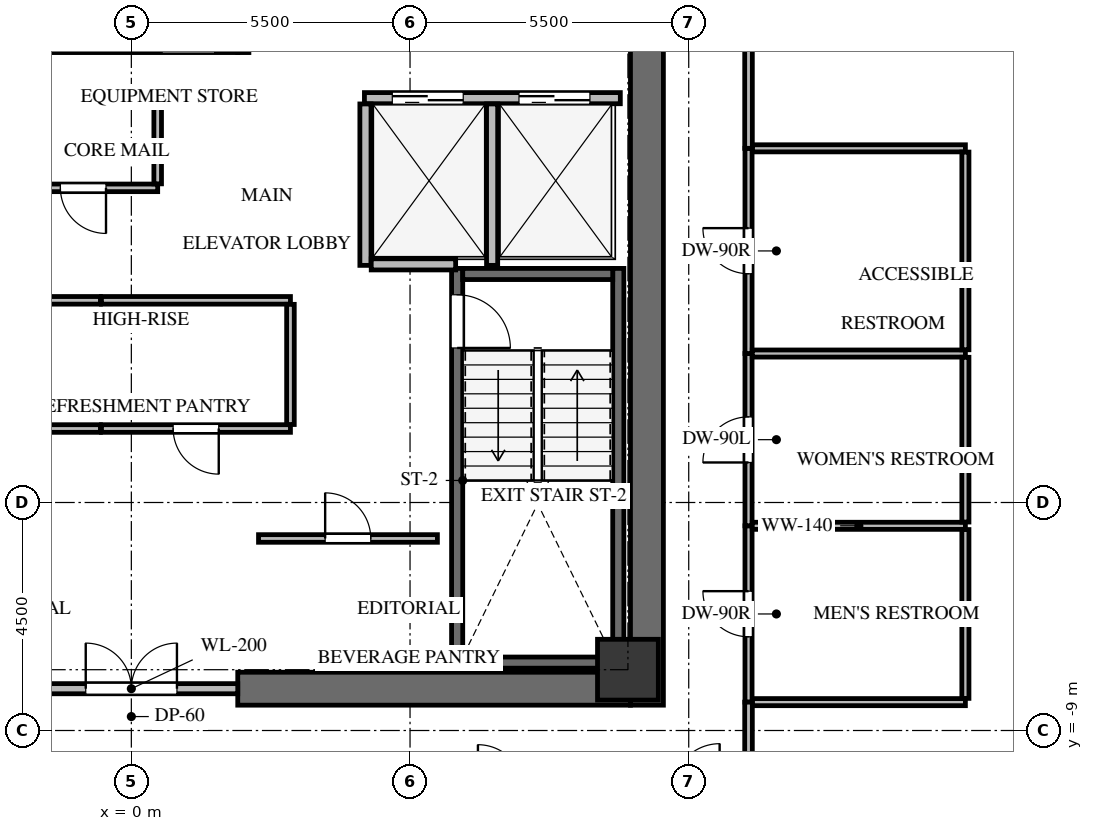
"""IFC4 building model, lengths in metres.
Left out: names, types, materials, properties, quantities, classifications, styles, units other than length and angle.
Written with IfcOpenShell. Run it as: python <this file> out.ifc"""

import sys

from ifc_helpers import new_model, si_unit, direction, frame, frame_2d, origin, origin_2d, place, context, subcontext, project, spatial, rectangle, extrude, source, transform, mapped, element, fill, save


model = new_model("IFC4")
c1 = context("Model", 3, precision=1e-05, world=origin(), true_north=direction((0.0, 1.0)))
c2 = subcontext(c1, "Body", "Model", "MODEL_VIEW")
j1 = project(units=[si_unit("LENGTHUNIT", "METRE"), si_unit("PLANEANGLEUNIT", "RADIAN")], contexts=[c1])
p1 = place(None, origin())
s1 = spatial("IfcSite", under=j1, at=p1, CompositionType="ELEMENT")
p2 = place(p1, origin())
s2 = spatial("IfcBuilding", under=s1, at=p2, CompositionType="ELEMENT")
p3 = place(p2, frame((0.0, 0.0, 173.8)))
s3 = spatial("IfcBuildingStorey", under=s2, at=p3, CompositionType="ELEMENT", Elevation=173.8)
p4 = place(p3, frame((10.175, -8.5, 0.0), z_axis=(0.0, 0.0, 1.0), x_axis=(0.0, 1.0, 0.0)))
e1 = element("IfcWall", 1, at=p4, inside=s3, PredefinedType="SHEAR", context=c2, shape_type="SweptSolid", body=[
    extrude(rectangle(XDim=17.0, YDim=0.65, at=frame_2d((8.5, 0.0))), origin(), (0.0, 0.0, 1.0), 3.3),
])
p5 = place(p3, frame((2.1, -8.175, 0.0), z_axis=(0.0, 0.0, 1.0), x_axis=(1.0, 0.0, 0.0)))
e2 = element("IfcWall", 2, at=p5, inside=s3, PredefinedType="SHEAR", context=c2, shape_type="SweptSolid", body=[
    extrude(rectangle(XDim=7.75, YDim=0.65, at=frame_2d((3.875, 0.0))), origin(), (0.0, 0.0, 1.0), 3.3),
])
p6 = place(p3, frame((9.61, -7.77, -0.24), z_axis=(0.0, 0.0, 1.0), x_axis=(0.0, 1.0, 0.0)))
e3 = element("IfcWall", 3, at=p6, inside=s3, PredefinedType="SHEAR", context=c2, shape_type="SweptSolid", body=[
    extrude(rectangle(XDim=7.89, YDim=0.22, at=frame_2d((3.945, 0.0))), origin(), (0.0, 0.0, 1.0), 3.3),
])
p7 = place(p3, frame((6.43, 0.12, -0.24), z_axis=(0.0, 0.0, 1.0), x_axis=(0.0, -1.0, 0.0)))
e4 = element("IfcWall", 4, at=p7, inside=s3, PredefinedType="SHEAR", context=c2, shape_type="SweptSolid", body=[
    extrude(rectangle(XDim=7.89, YDim=0.22, at=frame_2d((3.945, 0.0))), origin(), (0.0, 0.0, 1.0), 3.3),
])
p8 = place(p7, frame((0.52, 0.0, 0.0)))
e5 = element("IfcOpeningElement", 5, at=p8, cuts=e4, PredefinedType="OPENING", context=c2, shape_type="SweptSolid", body=[
    extrude(rectangle(XDim=1.05, YDim=2.15, at=frame_2d((0.525, 1.075))), frame((0.0, 0.12, 0.0), z_axis=(0.0, -1.0, 0.0), x_axis=(1.0, 0.0, 0.0)), (0.0, 0.0, 1.0), 0.24),
])
for number, where, z_axis, x_axis in (
    (6, (6.54, -7.66, -0.24), (0.0, 0.0, 1.0), (1.0, 0.0, 0.0)),
    (7, (9.5, 0.01, -0.24), (0.0, 0.0, 1.0), (-1.0, 0.0, 0.0)),
):
    element("IfcWall", number, at=place(p3, frame(where, z_axis=z_axis, x_axis=x_axis)), inside=s3, PredefinedType="SHEAR", context=c2, shape_type="SweptSolid", body=[
        extrude(rectangle(XDim=2.96, YDim=0.22, at=frame_2d((1.48, 0.0))), origin(), (0.0, 0.0, 1.0), 3.3),
    ])
p9 = place(p3, frame((2.21, 4.38, -0.24), z_axis=(0.0, 0.0, 1.0), x_axis=(0.0, 1.0, 0.0)))
e8 = element("IfcWall", 8, at=p9, inside=s3, PredefinedType="SHEAR", context=c2, shape_type="SweptSolid", body=[
    extrude(rectangle(XDim=3.4, YDim=0.22, at=frame_2d((1.7, 0.0))), origin(), (0.0, 0.0, 1.0), 3.3),
])
p10 = place(p3, frame((-5.25, 4.49, -0.24), z_axis=(0.0, 0.0, 1.0), x_axis=(1.0, 0.0, 0.0)))
e9 = element("IfcWall", 9, at=p10, inside=s3, PredefinedType="SHEAR", context=c2, shape_type="SweptSolid", body=[
    extrude(rectangle(XDim=7.35, YDim=0.22, at=frame_2d((3.675, 0.0))), origin(), (0.0, 0.0, 1.0), 3.3),
])
p11 = place(p10, frame((5.85, 0.0, 0.0)))
e10 = element("IfcOpeningElement", 10, at=p11, cuts=e9, PredefinedType="OPENING", context=c2, shape_type="SweptSolid", body=[
    extrude(rectangle(XDim=1.05, YDim=2.15, at=frame_2d((0.525, 1.075))), frame((0.0, 0.12, 0.0), z_axis=(0.0, -1.0, 0.0), x_axis=(1.0, 0.0, 0.0)), (0.0, 0.0, 1.0), 0.24),
])
m1 = source(origin(), c2, "Body", "SweptSolid", [
    extrude(rectangle(XDim=1.2, YDim=1.2, at=origin_2d()), origin(), (0.0, 0.0, 1.0), 3.3),
])
p12 = place(p3, frame((9.8, -7.8, -0.24), z_axis=(0.0, 0.0, 1.0), x_axis=(1.0, 0.0, 0.0)))
e11 = element("IfcColumn", 11, at=p12, inside=s3, PredefinedType="COLUMN", context=c2, shape_type="MappedRepresentation", body=[
    mapped(m1, transform((0.0, 0.0, 0.0), x_axis=(1.0, 0.0, 0.0), y_axis=(0.0, 1.0, 0.0), z_axis=(0.0, 0.0, 1.0), scale=1.0)),
])
p13 = place(p3, frame((-2.1, -8.175, 0.0), z_axis=(0.0, 0.0, 1.0), x_axis=(1.0, 0.0, 0.0)))
e12 = element("IfcWall", 12, at=p13, inside=s3, PredefinedType="SOLIDWALL", context=c2, shape_type="SweptSolid", body=[
    extrude(rectangle(XDim=4.2, YDim=0.2, at=frame_2d((2.1, 0.0))), origin(), (0.0, 0.0, 1.0), 3.045),
])
p14 = place(p13, frame((1.2, 0.0, 0.0)))
e13 = element("IfcOpeningElement", 13, at=p14, cuts=e12, PredefinedType="OPENING", context=c2, shape_type="SweptSolid", body=[
    extrude(rectangle(XDim=1.8, YDim=2.15, at=frame_2d((0.9, 1.075))), frame((0.0, 0.11, 0.0), z_axis=(0.0, -1.0, 0.0), x_axis=(1.0, 0.0, 0.0)), (0.0, 0.0, 1.0), 0.22),
])
p15 = place(p3, frame((4.6, 3.48, 0.0), z_axis=(0.0, 0.0, 1.0), x_axis=(1.0, 0.0, 0.0)))
e14 = element("IfcWall", 14, at=p15, inside=s3, PredefinedType="SOLIDWALL", context=c2, shape_type="SweptSolid", body=[
    extrude(rectangle(XDim=5.05, YDim=0.22, at=frame_2d((2.525, 0.0))), origin(), (0.0, 0.0, 1.0), 3.045),
])
p16 = place(p15, frame((0.55, 0.0, 0.0)))
e15 = element("IfcOpeningElement", 15, at=p16, cuts=e14, PredefinedType="OPENING", context=c2, shape_type="SweptSolid", body=[
    extrude(rectangle(XDim=1.4, YDim=2.15, at=frame_2d((0.7, 1.075))), frame((0.0, 0.12, 0.0), z_axis=(0.0, -1.0, 0.0), x_axis=(1.0, 0.0, 0.0)), (0.0, 0.0, 1.0), 0.24),
])
p17 = place(p15, frame((3.05, 0.0, 0.0)))
e16 = element("IfcOpeningElement", 16, at=p17, cuts=e14, PredefinedType="OPENING", context=c2, shape_type="SweptSolid", body=[
    extrude(rectangle(XDim=1.4, YDim=2.15, at=frame_2d((0.7, 1.075))), frame((0.0, 0.12, 0.0), z_axis=(0.0, -1.0, 0.0), x_axis=(1.0, 0.0, 0.0)), (0.0, 0.0, 1.0), 0.24),
])
for number, where, z_axis, x_axis in (
    (17, (4.62, 0.18, 0.0), (0.0, 0.0, 1.0), (0.0, 1.0, 0.0)),
    (18, (7.12, 0.18, 0.0), (0.0, 0.0, 1.0), (0.0, 1.0, 0.0)),
):
    element("IfcWall", number, at=place(p3, frame(where, z_axis=z_axis, x_axis=x_axis)), inside=s3, PredefinedType="SOLIDWALL", context=c2, shape_type="SweptSolid", body=[
        extrude(rectangle(XDim=3.186, YDim=0.22, at=frame_2d((1.593, 0.0))), origin(), (0.0, 0.0, 1.0), 3.045),
    ])
p18 = place(p3, frame((4.734, 0.2, 0.0), z_axis=(0.0, 0.0, 1.0), x_axis=(1.0, 0.0, 0.0)))
e19 = element("IfcWall", 19, at=p18, inside=s3, PredefinedType="SOLIDWALL", context=c2, shape_type="SweptSolid", body=[
    extrude(rectangle(XDim=1.666, YDim=0.22, at=frame_2d((0.833, 0.0))), origin(), (0.0, 0.0, 1.0), 3.045),
])
p19 = place(p3, frame((2.51, -5.21, 0.0), z_axis=(0.0, 0.0, 1.0), x_axis=(1.0, 0.0, 0.0)))
e20 = element("IfcWall", 20, at=p19, inside=s3, PredefinedType="PARTITIONING", context=c2, shape_type="SweptSolid", body=[
    extrude(rectangle(XDim=3.53, YDim=0.15, at=frame_2d((1.765, 0.0))), origin(), (0.0, 0.0, 1.0), 3.045),
])
p20 = place(p19, frame((1.315, 0.0, 0.0)))
e21 = element("IfcOpeningElement", 21, at=p20, cuts=e20, PredefinedType="OPENING", context=c2, shape_type="SweptSolid", body=[
    extrude(rectangle(XDim=0.9, YDim=2.05, at=frame_2d((0.45, 1.025))), frame((0.0, 0.085, 0.0), z_axis=(0.0, -1.0, 0.0), x_axis=(1.0, 0.0, 0.0)), (0.0, 0.0, 1.0), 0.17),
])
p21 = place(p3, frame((-0.61, -3.04, 0.0), z_axis=(0.0, 0.0, 1.0), x_axis=(-1.0, 0.0, 0.0)))
e22 = element("IfcWall", 22, at=p21, inside=s3, PredefinedType="PARTITIONING", context=c2, shape_type="SweptSolid", body=[
    extrude(rectangle(XDim=3.73, YDim=0.15, at=frame_2d((1.865, 0.0))), origin(), (0.0, 0.0, 1.0), 3.045),
])
p22 = place(p21, frame((1.415, 0.0, 0.0)))
e23 = element("IfcOpeningElement", 23, at=p22, cuts=e22, PredefinedType="OPENING", context=c2, shape_type="SweptSolid", body=[
    extrude(rectangle(XDim=0.9, YDim=2.05, at=frame_2d((0.45, 1.025))), frame((0.0, 0.085, 0.0), z_axis=(0.0, -1.0, 0.0), x_axis=(1.0, 0.0, 0.0)), (0.0, 0.0, 1.0), 0.17),
])
p23 = place(p3, frame((-4.34, -0.51, 0.0), z_axis=(0.0, 0.0, 1.0), x_axis=(1.0, 0.0, 0.0)))
e24 = element("IfcWall", 24, at=p23, inside=s3, PredefinedType="PARTITIONING", context=c2, shape_type="SweptSolid", body=[
    extrude(rectangle(XDim=3.73, YDim=0.15, at=frame_2d((1.865, 0.0))), origin(), (0.0, 0.0, 1.0), 3.045),
])
p24 = place(p3, frame((3.14, -3.04, 0.0), z_axis=(0.0, 0.0, 1.0), x_axis=(-1.0, 0.0, 0.0)))
e25 = element("IfcWall", 25, at=p24, inside=s3, PredefinedType="PARTITIONING", context=c2, shape_type="SweptSolid", body=[
    extrude(rectangle(XDim=3.73, YDim=0.15, at=frame_2d((1.865, 0.0))), origin(), (0.0, 0.0, 1.0), 3.045),
])
p25 = place(p24, frame((1.415, 0.0, 0.0)))
e26 = element("IfcOpeningElement", 26, at=p25, cuts=e25, PredefinedType="OPENING", context=c2, shape_type="SweptSolid", body=[
    extrude(rectangle(XDim=0.9, YDim=2.05, at=frame_2d((0.45, 1.025))), frame((0.0, 0.085, 0.0), z_axis=(0.0, -1.0, 0.0), x_axis=(1.0, 0.0, 0.0)), (0.0, 0.0, 1.0), 0.17),
])
p26 = place(p3, frame((-0.59, -0.51, 0.0), z_axis=(0.0, 0.0, 1.0), x_axis=(1.0, 0.0, 0.0)))
e27 = element("IfcWall", 27, at=p26, inside=s3, PredefinedType="PARTITIONING", context=c2, shape_type="SweptSolid", body=[
    extrude(rectangle(XDim=3.73, YDim=0.15, at=frame_2d((1.865, 0.0))), origin(), (0.0, 0.0, 1.0), 3.045),
])
p27 = place(p3, frame((3.14, -0.589, 0.0), z_axis=(0.0, 0.0, 1.0), x_axis=(0.0, -1.0, 0.0)))
e28 = element("IfcWall", 28, at=p27, inside=s3, PredefinedType="PARTITIONING", context=c2, shape_type="SweptSolid", body=[
    extrude(rectangle(XDim=2.372, YDim=0.15, at=frame_2d((1.186, 0.0))), origin(), (0.0, 0.0, 1.0), 3.045),
])
p28 = place(p3, frame((0.52, 1.71, 0.0), z_axis=(0.0, 0.0, 1.0), x_axis=(-1.0, 0.0, 0.0)))
e29 = element("IfcWall", 29, at=p28, inside=s3, PredefinedType="PARTITIONING", context=c2, shape_type="SweptSolid", body=[
    extrude(rectangle(XDim=2.94, YDim=0.15, at=frame_2d((1.47, 0.0))), origin(), (0.0, 0.0, 1.0), 3.045),
])
p29 = place(p28, frame((1.02, 0.0, 0.0)))
e30 = element("IfcOpeningElement", 30, at=p29, cuts=e29, PredefinedType="OPENING", context=c2, shape_type="SweptSolid", body=[
    extrude(rectangle(XDim=0.9, YDim=2.05, at=frame_2d((0.45, 1.025))), frame((0.0, 0.085, 0.0), z_axis=(0.0, -1.0, 0.0), x_axis=(1.0, 0.0, 0.0)), (0.0, 0.0, 1.0), 0.17),
])
p30 = place(p3, frame((0.52, 3.3, 0.0), z_axis=(0.0, 0.0, 1.0), x_axis=(0.0, -1.0, 0.0)))
e31 = element("IfcWall", 31, at=p30, inside=s3, PredefinedType="PARTITIONING", context=c2, shape_type="SweptSolid", body=[
    extrude(rectangle(XDim=1.511, YDim=0.15, at=frame_2d((0.755, 0.0))), origin(), (0.0, 0.0, 1.0), 3.045),
])
p31 = place(p3, frame((12.18, -8.44, 0.0), z_axis=(0.0, 0.0, 1.0), x_axis=(0.0, 1.0, 0.0)))
e32 = element("IfcWall", 32, at=p31, inside=s3, PredefinedType="PARTITIONING", context=c2, shape_type="SweptSolid", body=[
    extrude(rectangle(XDim=3.48, YDim=0.14, at=frame_2d((1.74, 0.0))), origin(), (0.0, 0.0, 1.0), 3.045),
])
p32 = place(p31, frame((1.29, 0.0, 0.0)))
e33 = element("IfcOpeningElement", 33, at=p32, cuts=e32, PredefinedType="OPENING", context=c2, shape_type="SweptSolid", body=[
    extrude(rectangle(XDim=0.9, YDim=2.05, at=frame_2d((0.45, 1.025))), frame((0.0, 0.08, 0.0), z_axis=(0.0, -1.0, 0.0), x_axis=(1.0, 0.0, 0.0)), (0.0, 0.0, 1.0), 0.16),
])
p33 = place(p3, frame((12.18, -4.96, 0.0), z_axis=(0.0, 0.0, 1.0), x_axis=(0.0, 1.0, 0.0)))
e34 = element("IfcWall", 34, at=p33, inside=s3, PredefinedType="PARTITIONING", context=c2, shape_type="SweptSolid", body=[
    extrude(rectangle(XDim=3.4, YDim=0.14, at=frame_2d((1.7, 0.0))), origin(), (0.0, 0.0, 1.0), 3.045),
])
p34 = place(p33, frame((1.25, 0.0, 0.0)))
e35 = element("IfcOpeningElement", 35, at=p34, cuts=e34, PredefinedType="OPENING", context=c2, shape_type="SweptSolid", body=[
    extrude(rectangle(XDim=0.9, YDim=2.05, at=frame_2d((0.45, 1.025))), frame((0.0, 0.08, 0.0), z_axis=(0.0, -1.0, 0.0), x_axis=(1.0, 0.0, 0.0)), (0.0, 0.0, 1.0), 0.16),
])
p35 = place(p3, frame((12.18, -1.56, 0.0), z_axis=(0.0, 0.0, 1.0), x_axis=(0.0, 1.0, 0.0)))
e36 = element("IfcWall", 36, at=p35, inside=s3, PredefinedType="PARTITIONING", context=c2, shape_type="SweptSolid", body=[
    extrude(rectangle(XDim=4.05, YDim=0.14, at=frame_2d((2.025, 0.0))), origin(), (0.0, 0.0, 1.0), 2.242),
])
p36 = place(p35, frame((1.575, 0.0, 0.0)))
e37 = element("IfcOpeningElement", 37, at=p36, cuts=e36, PredefinedType="OPENING", context=c2, shape_type="SweptSolid", body=[
    extrude(rectangle(XDim=0.9, YDim=2.05, at=frame_2d((0.45, 1.025))), frame((0.0, 0.08, 0.0), z_axis=(0.0, -1.0, 0.0), x_axis=(1.0, 0.0, 0.0)), (0.0, 0.0, 1.0), 0.16),
])
p37 = place(p3, frame((12.18, 2.49, 0.0), z_axis=(0.0, 0.0, 1.0), x_axis=(0.0, 1.0, 0.0)))
e38 = element("IfcWall", 38, at=p37, inside=s3, PredefinedType="PARTITIONING", context=c2, shape_type="SweptSolid", body=[
    extrude(rectangle(XDim=7.611, YDim=0.15, at=frame_2d((3.806, 0.0))), origin(), (0.0, 0.0, 1.0), 3.045),
])
p38 = place(p37, frame((3.331, 0.0, 0.0)))
e39 = element("IfcOpeningElement", 39, at=p38, cuts=e38, PredefinedType="OPENING", context=c2, shape_type="SweptSolid", body=[
    extrude(rectangle(XDim=0.95, YDim=2.1, at=frame_2d((0.475, 1.05))), frame((0.0, 0.085, 0.0), z_axis=(0.0, -1.0, 0.0), x_axis=(1.0, 0.0, 0.0)), (0.0, 0.0, 1.0), 0.17),
])
p39 = place(p3, frame((12.18, -10.101, 0.0), z_axis=(0.0, 0.0, 1.0), x_axis=(0.0, 1.0, 0.0)))
e40 = element("IfcWall", 40, at=p39, inside=s3, PredefinedType="PARTITIONING", context=c2, shape_type="SweptSolid", body=[
    extrude(rectangle(XDim=1.661, YDim=0.15, at=frame_2d((0.831, 0.0))), origin(), (0.0, 0.0, 1.0), 3.045),
])
p40 = place(p3, frame((12.254, -4.96, 0.0), z_axis=(0.0, 0.0, 1.0), x_axis=(1.0, 0.0, 0.0)))
e41 = element("IfcWall", 41, at=p40, inside=s3, PredefinedType="PARTITIONING", context=c2, shape_type="SweptSolid", body=[
    extrude(rectangle(XDim=4.206, YDim=0.14, at=frame_2d((2.103, 0.0))), origin(), (0.0, 0.0, 1.0), 3.045),
])
p41 = place(p3, frame((16.46, -8.44, 0.0), z_axis=(0.0, 0.0, 1.0), x_axis=(-1.0, 0.0, 0.0)))
e42 = element("IfcWall", 42, at=p41, inside=s3, PredefinedType="PARTITIONING", context=c2, shape_type="SweptSolid", body=[
    extrude(rectangle(XDim=4.201, YDim=0.14, at=frame_2d((2.101, 0.0))), origin(), (0.0, 0.0, 1.0), 3.045),
])
p42 = place(p3, frame((16.46, -5.034, 0.0), z_axis=(0.0, 0.0, 1.0), x_axis=(0.0, -1.0, 0.0)))
e43 = element("IfcWall", 43, at=p42, inside=s3, PredefinedType="PARTITIONING", context=c2, shape_type="SweptSolid", body=[
    extrude(rectangle(XDim=3.332, YDim=0.14, at=frame_2d((1.666, 0.0))), origin(), (0.0, 0.0, 1.0), 3.045),
])
p43 = place(p3, frame((12.254, -1.56, 0.0), z_axis=(0.0, 0.0, 1.0), x_axis=(1.0, 0.0, 0.0)))
e44 = element("IfcWall", 44, at=p43, inside=s3, PredefinedType="PARTITIONING", context=c2, shape_type="SweptSolid", body=[
    extrude(rectangle(XDim=4.206, YDim=0.14, at=frame_2d((2.103, 0.0))), origin(), (0.0, 0.0, 1.0), 3.045),
])
p44 = place(p3, frame((16.46, -1.634, 0.0), z_axis=(0.0, 0.0, 1.0), x_axis=(0.0, -1.0, 0.0)))
e45 = element("IfcWall", 45, at=p44, inside=s3, PredefinedType="PARTITIONING", context=c2, shape_type="SweptSolid", body=[
    extrude(rectangle(XDim=3.252, YDim=0.14, at=frame_2d((1.626, 0.0))), origin(), (0.0, 0.0, 1.0), 3.045),
])
p45 = place(p3, frame((12.259, 2.49, 0.0), z_axis=(0.0, 0.0, 1.0), x_axis=(1.0, 0.0, 0.0)))
e46 = element("IfcWall", 46, at=p45, inside=s3, PredefinedType="PARTITIONING", context=c2, shape_type="SweptSolid", body=[
    extrude(rectangle(XDim=4.201, YDim=0.14, at=frame_2d((2.101, 0.0))), origin(), (0.0, 0.0, 1.0), 3.045),
])
p46 = place(p3, frame((16.46, 2.416, 0.0), z_axis=(0.0, 0.0, 1.0), x_axis=(0.0, -1.0, 0.0)))
e47 = element("IfcWall", 47, at=p46, inside=s3, PredefinedType="PARTITIONING", context=c2, shape_type="SweptSolid", body=[
    extrude(rectangle(XDim=3.902, YDim=0.14, at=frame_2d((1.951, 0.0))), origin(), (0.0, 0.0, 1.0), 2.242),
])
m2 = source(origin(), c2, "Body", "SweptSolid", [
    extrude(rectangle(XDim=1.05, YDim=2.15, at=frame_2d((0.525, 1.075))), frame((0.0, 0.025, 0.0), z_axis=(0.0, -1.0, 0.0), x_axis=(1.0, 0.0, 0.0)), (0.0, 0.0, 1.0), 0.05),
])
p47 = place(p8, origin())
e48 = element("IfcDoor", 48, at=p47, inside=s3, OperationType="SINGLE_SWING_RIGHT", PredefinedType="DOOR", context=c2, shape_type="MappedRepresentation", body=[
    mapped(m2, transform((0.0, 0.0, 0.0), x_axis=(1.0, 0.0, 0.0), y_axis=(0.0, 1.0, 0.0), z_axis=(0.0, 0.0, 1.0), scale=1.0)),
])
fill(e5, e48)
m3 = source(origin(), c2, "Body", "SweptSolid", [
    extrude(rectangle(XDim=1.8, YDim=2.15, at=frame_2d((0.9, 1.075))), frame((0.0, 0.025, 0.0), z_axis=(0.0, -1.0, 0.0), x_axis=(1.0, 0.0, 0.0)), (0.0, 0.0, 1.0), 0.05),
])
p48 = place(p14, origin())
e49 = element("IfcDoor", 49, at=p48, inside=s3, OperationType="DOUBLE_DOOR_SINGLE_SWING", PredefinedType="DOOR", context=c2, shape_type="MappedRepresentation", body=[
    mapped(m3, transform((0.0, 0.0, 0.0), x_axis=(1.0, 0.0, 0.0), y_axis=(0.0, 1.0, 0.0), z_axis=(0.0, 0.0, 1.0), scale=1.0)),
])
fill(e13, e49)
m4 = source(origin(), c2, "Body", "SweptSolid", [
    extrude(rectangle(XDim=1.4, YDim=2.15, at=frame_2d((0.7, 1.075))), frame((0.0, 0.025, 0.0), z_axis=(0.0, -1.0, 0.0), x_axis=(1.0, 0.0, 0.0)), (0.0, 0.0, 1.0), 0.05),
])
p49 = place(p16, origin())
e50 = element("IfcDoor", 50, at=p49, inside=s3, OperationType="DOUBLE_DOOR_SLIDING", PredefinedType="DOOR", context=c2, shape_type="MappedRepresentation", body=[
    mapped(m4, transform((0.0, 0.0, 0.0), x_axis=(1.0, 0.0, 0.0), y_axis=(0.0, 1.0, 0.0), z_axis=(0.0, 0.0, 1.0), scale=1.0)),
])
fill(e15, e50)
p50 = place(p17, origin())
e51 = element("IfcDoor", 51, at=p50, inside=s3, OperationType="DOUBLE_DOOR_SLIDING", PredefinedType="DOOR", context=c2, shape_type="MappedRepresentation", body=[
    mapped(m4, transform((0.0, 0.0, 0.0), x_axis=(1.0, 0.0, 0.0), y_axis=(0.0, 1.0, 0.0), z_axis=(0.0, 0.0, 1.0), scale=1.0)),
])
fill(e16, e51)
m5 = source(origin(), c2, "Body", "SweptSolid", [
    extrude(rectangle(XDim=0.9, YDim=2.05, at=frame_2d((0.45, 1.025))), frame((0.0, 0.025, 0.0), z_axis=(0.0, -1.0, 0.0), x_axis=(1.0, 0.0, 0.0)), (0.0, 0.0, 1.0), 0.05),
])
p51 = place(p20, origin())
e52 = element("IfcDoor", 52, at=p51, inside=s3, OperationType="SINGLE_SWING_LEFT", PredefinedType="DOOR", context=c2, shape_type="MappedRepresentation", body=[
    mapped(m5, transform((0.0, 0.0, 0.0), x_axis=(1.0, 0.0, 0.0), y_axis=(0.0, 1.0, 0.0), z_axis=(0.0, 0.0, 1.0), scale=1.0)),
])
fill(e21, e52)
p52 = place(p25, origin())
e53 = element("IfcDoor", 53, at=p52, inside=s3, OperationType="SINGLE_SWING_LEFT", PredefinedType="DOOR", context=c2, shape_type="MappedRepresentation", body=[
    mapped(m5, transform((0.0, 0.0, 0.0), x_axis=(1.0, 0.0, 0.0), y_axis=(0.0, 1.0, 0.0), z_axis=(0.0, 0.0, 1.0), scale=1.0)),
])
fill(e26, e53)
p53 = place(p29, origin())
e54 = element("IfcDoor", 54, at=p53, inside=s3, OperationType="SINGLE_SWING_LEFT", PredefinedType="DOOR", context=c2, shape_type="MappedRepresentation", body=[
    mapped(m5, transform((0.0, 0.0, 0.0), x_axis=(1.0, 0.0, 0.0), y_axis=(0.0, 1.0, 0.0), z_axis=(0.0, 0.0, 1.0), scale=1.0)),
])
fill(e30, e54)
m6 = source(origin(), c2, "Body", "SweptSolid", [
    extrude(rectangle(XDim=0.9, YDim=2.05, at=frame_2d((0.45, 1.025))), frame((0.0, 0.025, 0.0), z_axis=(0.0, -1.0, 0.0), x_axis=(1.0, 0.0, 0.0)), (0.0, 0.0, 1.0), 0.05),
])
p54 = place(p32, origin())
e55 = element("IfcDoor", 55, at=p54, inside=s3, OperationType="SINGLE_SWING_RIGHT", PredefinedType="DOOR", context=c2, shape_type="MappedRepresentation", body=[
    mapped(m6, transform((0.0, 0.0, 0.0), x_axis=(1.0, 0.0, 0.0), y_axis=(0.0, 1.0, 0.0), z_axis=(0.0, 0.0, 1.0), scale=1.0)),
])
fill(e33, e55)
m7 = source(origin(), c2, "Body", "SweptSolid", [
    extrude(rectangle(XDim=0.9, YDim=2.05, at=frame_2d((0.45, 1.025))), frame((0.0, 0.025, 0.0), z_axis=(0.0, -1.0, 0.0), x_axis=(1.0, 0.0, 0.0)), (0.0, 0.0, 1.0), 0.05),
])
p55 = place(p34, origin())
e56 = element("IfcDoor", 56, at=p55, inside=s3, OperationType="SINGLE_SWING_LEFT", PredefinedType="DOOR", context=c2, shape_type="MappedRepresentation", body=[
    mapped(m7, transform((0.0, 0.0, 0.0), x_axis=(1.0, 0.0, 0.0), y_axis=(0.0, 1.0, 0.0), z_axis=(0.0, 0.0, 1.0), scale=1.0)),
])
fill(e35, e56)
p56 = place(p36, origin())
e57 = element("IfcDoor", 57, at=p56, inside=s3, OperationType="SINGLE_SWING_RIGHT", PredefinedType="DOOR", context=c2, shape_type="MappedRepresentation", body=[
    mapped(m6, transform((0.0, 0.0, 0.0), x_axis=(1.0, 0.0, 0.0), y_axis=(0.0, 1.0, 0.0), z_axis=(0.0, 0.0, 1.0), scale=1.0)),
])
fill(e37, e57)
save(model, sys.argv[1])
